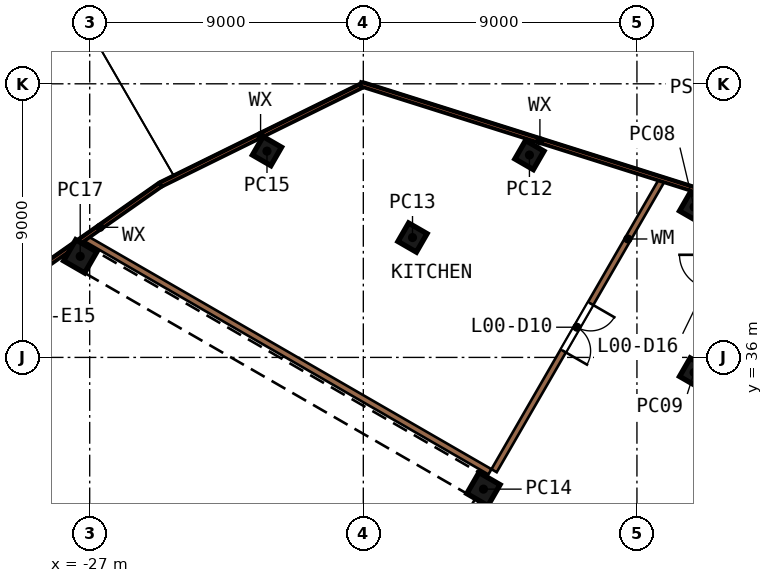
"""IFC4 building model, lengths in metres.
Left out: names, types, materials, properties, quantities, classifications, styles, units other than length and angle.
Written with IfcOpenShell. Run it as: python <this file> out.ifc"""

import sys

from ifc_helpers import new_model, si_unit, direction, frame, frame_2d, origin, origin_2d, place, context, subcontext, project, spatial, rectangle, extrude, element, fill, save


model = new_model("IFC4")
c1 = context("Model", 3, precision=1e-05, world=origin(), true_north=direction((0.0, 1.0)))
c2 = subcontext(c1, "Body", "Model", "MODEL_VIEW")
j1 = project(units=[si_unit("LENGTHUNIT", "METRE"), si_unit("PLANEANGLEUNIT", "RADIAN")], contexts=[c1])
p1 = place(None, origin())
s1 = spatial("IfcSite", under=j1, at=p1, CompositionType="ELEMENT")
p2 = place(p1, origin())
s2 = spatial("IfcBuilding", under=s1, at=p2, CompositionType="ELEMENT")
p3 = place(p2, origin())
s3 = spatial("IfcBuildingStorey", under=s2, at=p3, CompositionType="ELEMENT", Elevation=0.0)
for number, where, z_axis, x_axis in (
    (1, (-7.12, 40.946, 0.0), (0.0, 0.0, 1.0), (-0.866, 0.5, 0.0)),
    (2, (-7.12, 35.503, 0.0), (0.0, 0.0, 1.0), (-0.866, 0.5, 0.0)),
    (3, (-12.536, 42.657, 0.0), (0.0, 0.0, 1.0), (-0.866, 0.5, 0.0)),
    (4, (-16.382, 39.942, 0.0), (0.0, 0.0, 1.0), (-0.866, 0.5, 0.0)),
):
    element("IfcColumn", number, at=place(p3, frame(where, z_axis=z_axis, x_axis=x_axis)), inside=s3, PredefinedType="COLUMN", context=c2, shape_type="SweptSolid", body=[
        extrude(rectangle(XDim=0.7, YDim=0.7, at=origin_2d()), origin(), (0.0, 0.0, 1.0), 8.0),
    ])
p4 = place(p3, frame((-14.049, 31.667, 0.0), z_axis=(0.0, 0.0, 1.0), x_axis=(-0.866025404, 0.5, 0.0)))
e5 = element("IfcColumn", 5, at=p4, inside=s3, PredefinedType="COLUMN", context=c2, shape_type="SweptSolid", body=[
    extrude(rectangle(XDim=0.8, YDim=0.8, at=origin_2d()), origin(), (0.0, 0.0, 1.0), 8.0),
])
p5 = place(p3, frame((-21.168, 42.786, 0.0), z_axis=(0.0, 0.0, 1.0), x_axis=(-0.866025404, 0.5, 0.0)))
e6 = element("IfcColumn", 6, at=p5, inside=s3, PredefinedType="COLUMN", context=c2, shape_type="SweptSolid", body=[
    extrude(rectangle(XDim=0.7, YDim=0.7, at=origin_2d()), origin(), (0.0, 0.0, 1.0), 8.0),
])
p6 = place(p3, frame((-27.312, 39.324, 0.0), z_axis=(0.0, 0.0, 1.0), x_axis=(-0.866025404, 0.5, 0.0)))
e7 = element("IfcColumn", 7, at=p6, inside=s3, PredefinedType="COLUMN", context=c2, shape_type="SweptSolid", body=[
    extrude(rectangle(XDim=0.8, YDim=0.8, at=origin_2d()), origin(), (0.0, 0.0, 1.0), 8.0),
])
p7 = place(p3, frame((-6.289, 41.26, 0.0), z_axis=(0.0, 0.0, 1.0), x_axis=(-0.953524528, 0.301315407, 0.0)))
e8 = element("IfcWall", 8, at=p7, inside=s3, PredefinedType="SOLIDWALL", context=c2, shape_type="SweptSolid", body=[
    extrude(rectangle(XDim=12.38, YDim=0.14, at=frame_2d((6.19, 0.0))), origin(), (0.0, 0.0, 1.0), 7.55),
])
p8 = place(p3, frame((-18.088, 44.915, 0.0), z_axis=(0.0, 0.0, 1.0), x_axis=(-0.897231327, -0.441560807, 0.0)))
e9 = element("IfcWall", 9, at=p8, inside=s3, PredefinedType="SOLIDWALL", context=c2, shape_type="SweptSolid", body=[
    extrude(rectangle(XDim=7.336, YDim=0.14, at=frame_2d((3.668, 0.0))), origin(), (0.0, 0.0, 1.0), 7.55),
])
p9 = place(p3, frame((-30.774, 37.396, 0.0), z_axis=(0.0, 0.0, 1.0), x_axis=(0.818847658, 0.5740109, 0.0)))
e10 = element("IfcWall", 10, at=p9, inside=s3, PredefinedType="SOLIDWALL", context=c2, shape_type="SweptSolid", body=[
    extrude(rectangle(XDim=7.466, YDim=0.14, at=frame_2d((3.733, 0.0))), origin(), (0.0, 0.0, 1.0), 7.55),
])
p10 = place(p9, frame((1.283, 0.0, 0.0)))
e11 = element("IfcOpeningElement", 11, at=p10, cuts=e10, PredefinedType="OPENING", context=c2, shape_type="SweptSolid", body=[
    extrude(rectangle(XDim=1.1, YDim=2.4, at=frame_2d((0.55, 1.2))), frame((0.0, 0.08, 0.0), z_axis=(0.0, -1.0, 0.0), x_axis=(1.0, 0.0, 0.0)), (0.0, 0.0, 1.0), 0.16),
])
p11 = place(p3, frame((-19.169, 22.799, 0.0), z_axis=(0.0, 0.0, 1.0), x_axis=(0.500006819, 0.866021467, 0.0)))
e12 = element("IfcWall", 12, at=p11, inside=s3, PredefinedType="PARTITIONING", context=c2, shape_type="SweptSolid", body=[
    extrude(rectangle(XDim=9.81, YDim=0.15, at=frame_2d((4.905, 0.0))), origin(), (0.0, 0.0, 1.0), 7.55),
])
p12 = place(p3, frame((-8.172, 41.846, 0.0), z_axis=(0.0, 0.0, 1.0), x_axis=(-0.499985024, -0.86603405, 0.0)))
e13 = element("IfcWall", 13, at=p12, inside=s3, PredefinedType="SOLIDWALL", context=c2, shape_type="SweptSolid", body=[
    extrude(rectangle(XDim=11.053, YDim=0.2, at=frame_2d((5.527, 0.0))), origin(), (0.0, 0.0, 1.0), 7.55),
])
p13 = place(p12, frame((4.704, 0.0, 0.0)))
e14 = element("IfcOpeningElement", 14, at=p13, cuts=e13, PredefinedType="OPENING", context=c2, shape_type="SweptSolid", body=[
    extrude(rectangle(XDim=1.8, YDim=2.1, at=frame_2d((0.9, 1.05))), frame((0.0, 0.11, 0.0), z_axis=(0.0, -1.0, 0.0), x_axis=(1.0, 0.0, 0.0)), (0.0, 0.0, 1.0), 0.22),
])
p14 = place(p3, frame((-13.835, 32.237, 0.0), z_axis=(0.0, 0.0, 1.0), x_axis=(-0.866027181, 0.499996921, 0.0)))
e15 = element("IfcWall", 15, at=p14, inside=s3, PredefinedType="SOLIDWALL", context=c2, shape_type="SweptSolid", body=[
    extrude(rectangle(XDim=15.348, YDim=0.2, at=frame_2d((7.674, 0.0))), origin(), (0.0, 0.0, 1.0), 7.55),
])
p15 = place(p13, origin())
e16 = element("IfcDoor", 16, at=p15, inside=s3, OperationType="DOUBLE_DOOR_SINGLE_SWING", PredefinedType="DOOR", context=c2, shape_type="SweptSolid", body=[
    extrude(rectangle(XDim=1.8, YDim=2.1, at=frame_2d((0.9, 1.05))), frame((0.0, 0.025, 0.0), z_axis=(0.0, -1.0, 0.0), x_axis=(1.0, 0.0, 0.0)), (0.0, 0.0, 1.0), 0.05),
])
fill(e14, e16)
save(model, sys.argv[1])
